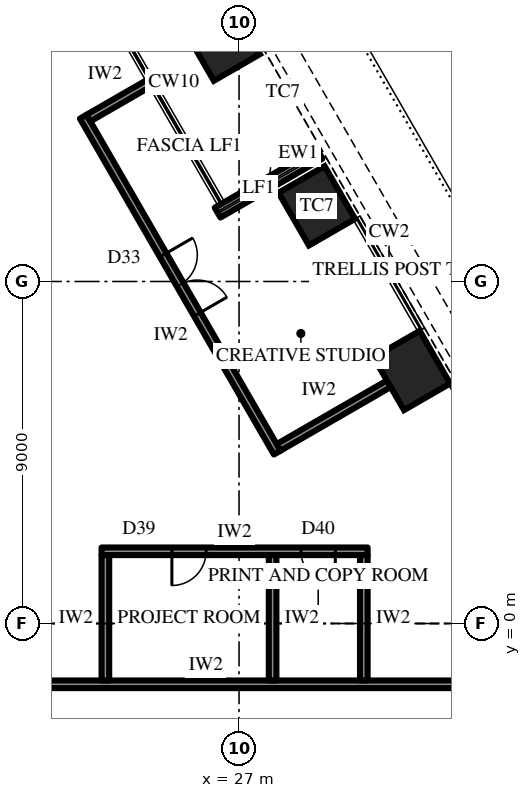
"""IFC4 building model, lengths in metres.
Left out: names, types, materials, properties, quantities, classifications, styles, units other than length and angle.
Written with IfcOpenShell. Run it as: python <this file> out.ifc"""

import sys

from ifc_helpers import new_model, si_unit, direction, frame, frame_2d, origin, origin_2d, place, context, subcontext, project, spatial, rectangle, extrude, element, fill, save


model = new_model("IFC4")
c1 = context("Model", 3, precision=1e-05, world=origin(), true_north=direction((0.0, 1.0)))
c2 = subcontext(c1, "Body", "Model", "MODEL_VIEW")
j1 = project(units=[si_unit("LENGTHUNIT", "METRE"), si_unit("PLANEANGLEUNIT", "RADIAN")], contexts=[c1])
p1 = place(None, origin())
s1 = spatial("IfcSite", under=j1, at=p1, CompositionType="ELEMENT")
p2 = place(p1, origin())
s2 = spatial("IfcBuilding", under=s1, at=p2, CompositionType="ELEMENT")
p3 = place(p2, frame((0.0, 0.0, 178.3)))
s3 = spatial("IfcBuildingStorey", under=s2, at=p3, CompositionType="ELEMENT", Elevation=178.3)
for number, where, z_axis, x_axis in (
    (1, (31.547, 6.658, 0.0), (0.0, 0.0, 1.0), (-0.5, 0.866, 0.0)),
    (2, (29.045, 10.992, 0.0), (0.0, 0.0, 1.0), (-0.5, 0.866, 0.0)),
    (3, (26.544, 15.325, 0.0), (0.0, 0.0, 1.0), (-0.5, 0.866, 0.0)),
):
    element("IfcColumn", number, at=place(p3, frame(where, z_axis=z_axis, x_axis=x_axis)), inside=s3, PredefinedType="COLUMN", context=c2, shape_type="SweptSolid", body=[
        extrude(rectangle(XDim=1.6, YDim=1.4, at=origin_2d()), origin(), (0.0, 0.0, 1.0), 4.2),
    ])
p4 = place(p3, frame((29.12, 12.363, 0.0), z_axis=(0.0, 0.0, 1.0), x_axis=(-0.86602952684, -0.49999285859, 0.0)))
e4 = element("IfcWall", 4, at=p4, inside=s3, PredefinedType="SOLIDWALL", context=c2, shape_type="SweptSolid", body=[
    extrude(rectangle(XDim=3.1, YDim=0.3, at=frame_2d((1.55, 0.0))), origin(), (0.0, 0.0, 1.0), 2.75),
])
p5 = place(p3, frame((28.003, 4.497, 0.0), z_axis=(0.0, 0.0, 1.0), x_axis=(-0.500005407604, 0.86602228168, 0.0)))
e5 = element("IfcWall", 5, at=p5, inside=s3, PredefinedType="PARTITIONING", context=c2, shape_type="SweptSolid", body=[
    extrude(rectangle(XDim=10.208, YDim=0.2, at=frame_2d((5.104, 0.0))), origin(), (0.0, 0.0, 1.0), 4.0),
])
p6 = place(p5, frame((4.204, 0.0, 0.0)))
e6 = element("IfcOpeningElement", 6, at=p6, cuts=e5, PredefinedType="OPENING", context=c2, shape_type="SweptSolid", body=[
    extrude(rectangle(XDim=1.8, YDim=2.4, at=frame_2d((0.9, 1.2))), frame((0.0, 0.11, 0.0), z_axis=(0.0, -1.0, 0.0), x_axis=(1.0, 0.0, 0.0)), (0.0, 0.0, 1.0), 0.22),
])
p7 = place(p3, frame((28.04, 4.633, 0.0), z_axis=(0.0, 0.0, 1.0), x_axis=(0.866014461049, 0.500018952895, 0.0)))
e7 = element("IfcWall", 7, at=p7, inside=s3, PredefinedType="PARTITIONING", context=c2, shape_type="SweptSolid", body=[
    extrude(rectangle(XDim=3.35, YDim=0.2, at=frame_2d((1.675, 0.0))), origin(), (0.0, 0.0, 1.0), 3.082),
])
p8 = place(p3, frame((23.036, 13.3, 0.0), z_axis=(0.0, 0.0, 1.0), x_axis=(0.866029456041, 0.49999298122, 0.0)))
e8 = element("IfcWall", 8, at=p8, inside=s3, PredefinedType="PARTITIONING", context=c2, shape_type="SweptSolid", body=[
    extrude(rectangle(XDim=1.901, YDim=0.2, at=frame_2d((0.95, 0.0))), origin(), (0.0, 0.0, 1.0), 4.0),
])
p9 = place(p3, frame((18.6, -1.6, 0.0), z_axis=(0.0, 0.0, 1.0), x_axis=(1.0, 0.0, 0.0)))
e9 = element("IfcWall", 9, at=p9, inside=s3, PredefinedType="PARTITIONING", context=c2, shape_type="SweptSolid", body=[
    extrude(rectangle(XDim=15.059, YDim=0.2, at=frame_2d((7.53, 0.0))), origin(), (0.0, 0.0, 1.0), 4.0),
])
p10 = place(p9, frame((1.006, 0.0, 0.0)))
e10 = element("IfcOpeningElement", 10, at=p10, cuts=e9, PredefinedType="OPENING", context=c2, shape_type="SweptSolid", body=[
    extrude(rectangle(XDim=1.0, YDim=2.2, at=frame_2d((0.5, 1.1))), frame((0.0, 0.11, 0.0), z_axis=(0.0, -1.0, 0.0), x_axis=(1.0, 0.0, 0.0)), (0.0, 0.0, 1.0), 0.22),
])
p11 = place(p3, frame((23.383, 1.9, 0.0), z_axis=(0.0, 0.0, 1.0), x_axis=(1.0, 0.0, 0.0)))
e11 = element("IfcWall", 11, at=p11, inside=s3, PredefinedType="PARTITIONING", context=c2, shape_type="SweptSolid", body=[
    extrude(rectangle(XDim=7.0, YDim=0.2, at=frame_2d((3.5, 0.0))), origin(), (0.0, 0.0, 1.0), 4.0),
])
p12 = place(p11, frame((1.85, 0.0, 0.0)))
e12 = element("IfcOpeningElement", 12, at=p12, cuts=e11, PredefinedType="OPENING", context=c2, shape_type="SweptSolid", body=[
    extrude(rectangle(XDim=0.9, YDim=2.2, at=frame_2d((0.45, 1.1))), frame((0.0, 0.11, 0.0), z_axis=(0.0, -1.0, 0.0), x_axis=(1.0, 0.0, 0.0)), (0.0, 0.0, 1.0), 0.22),
])
p13 = place(p11, frame((5.25, 0.0, 0.0)))
e13 = element("IfcOpeningElement", 13, at=p13, cuts=e11, PredefinedType="OPENING", context=c2, shape_type="SweptSolid", body=[
    extrude(rectangle(XDim=0.9, YDim=2.2, at=frame_2d((0.45, 1.1))), frame((0.0, 0.11, 0.0), z_axis=(0.0, -1.0, 0.0), x_axis=(1.0, 0.0, 0.0)), (0.0, 0.0, 1.0), 0.22),
])
for number, where, z_axis, x_axis in (
    (14, (23.483, -1.5, 0.0), (0.0, 0.0, 1.0), (0.0, 1.0, 0.0)),
    (15, (27.883, -1.5, 0.0), (0.0, 0.0, 1.0), (0.0, 1.0, 0.0)),
    (16, (30.283, -1.5, 0.0), (0.0, 0.0, 1.0), (0.0, 1.0, 0.0)),
):
    element("IfcWall", number, at=place(p3, frame(where, z_axis=z_axis, x_axis=x_axis)), inside=s3, PredefinedType="PARTITIONING", context=c2, shape_type="SweptSolid", body=[
        extrude(rectangle(XDim=3.3, YDim=0.2, at=frame_2d((1.65, 0.0))), origin(), (0.0, 0.0, 1.0), 4.0),
    ])
p14 = place(p6, frame((1.8, 0.0, 0.0), z_axis=(0.0, 0.0, 1.0), x_axis=(-1.0, 0.0, 0.0)))
e17 = element("IfcDoor", 17, at=p14, inside=s3, OperationType="DOUBLE_DOOR_SINGLE_SWING", PredefinedType="DOOR", context=c2, shape_type="SweptSolid", body=[
    extrude(rectangle(XDim=1.8, YDim=2.4, at=frame_2d((0.9, 1.2))), frame((0.0, 0.025, 0.0), z_axis=(0.0, -1.0, 0.0), x_axis=(1.0, 0.0, 0.0)), (0.0, 0.0, 1.0), 0.05),
])
fill(e6, e17)
p15 = place(p12, frame((0.9, 0.0, 0.0), z_axis=(0.0, 0.0, 1.0), x_axis=(-1.0, 0.0, 0.0)))
e18 = element("IfcDoor", 18, at=p15, inside=s3, OperationType="SINGLE_SWING_LEFT", PredefinedType="DOOR", context=c2, shape_type="SweptSolid", body=[
    extrude(rectangle(XDim=0.9, YDim=2.2, at=frame_2d((0.45, 1.1))), frame((0.0, 0.025, 0.0), z_axis=(0.0, -1.0, 0.0), x_axis=(1.0, 0.0, 0.0)), (0.0, 0.0, 1.0), 0.05),
])
fill(e12, e18)
p16 = place(p13, frame((0.9, 0.0, 0.0), z_axis=(0.0, 0.0, 1.0), x_axis=(-1.0, 0.0, 0.0)))
e19 = element("IfcDoor", 19, at=p16, inside=s3, OperationType="SINGLE_SWING_RIGHT", PredefinedType="DOOR", context=c2, shape_type="SweptSolid", body=[
    extrude(rectangle(XDim=0.9, YDim=2.2, at=frame_2d((0.45, 1.1))), frame((0.0, 0.025, 0.0), z_axis=(0.0, -1.0, 0.0), x_axis=(1.0, 0.0, 0.0)), (0.0, 0.0, 1.0), 0.05),
])
fill(e13, e19)
save(model, sys.argv[1])
